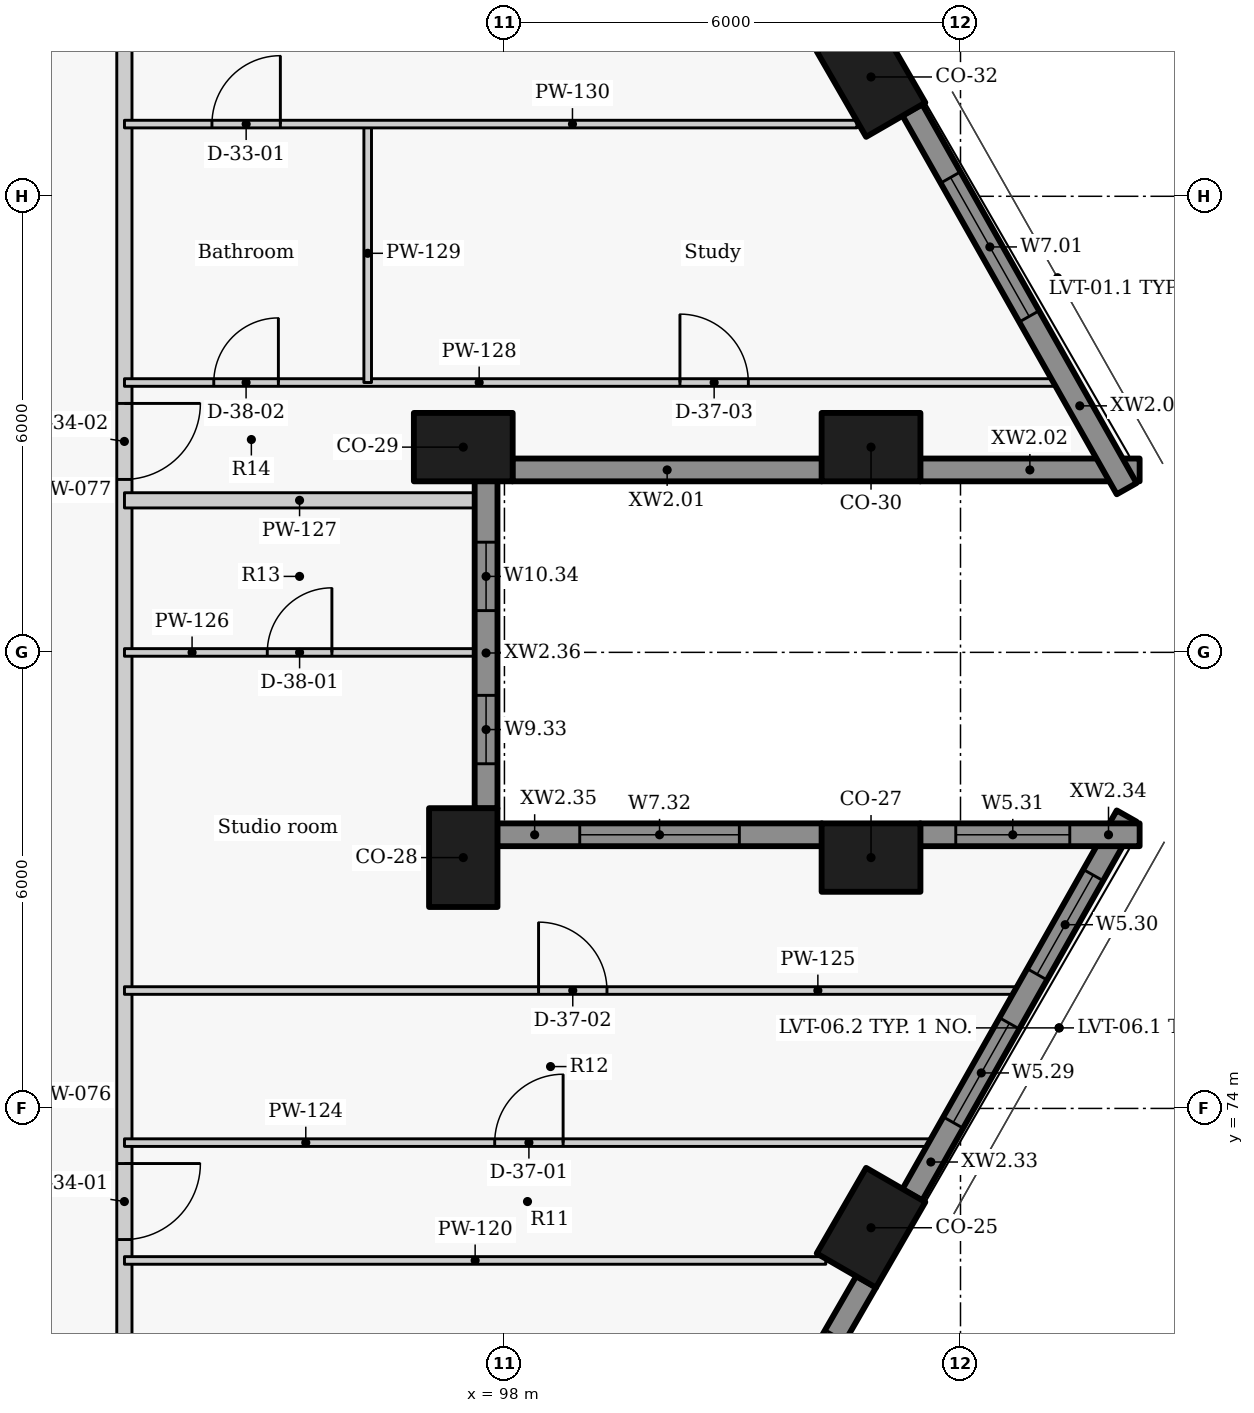
"""IFC4 building model, lengths in metres.
Left out: names, types, materials, properties, quantities, classifications, styles, units other than length and angle.
Written with IfcOpenShell. Run it as: python <this file> out.ifc"""

import sys

from ifc_helpers import new_model, si_unit, direction, frame, frame_2d, origin, origin_2d, place, context, subcontext, project, spatial, rectangle, extrude, element, fill, save


model = new_model("IFC4")
c1 = context("Model", 3, precision=1e-05, world=origin(), true_north=direction((0.0, 1.0)))
c2 = subcontext(c1, "Body", "Model", "MODEL_VIEW")
j1 = project(units=[si_unit("LENGTHUNIT", "METRE"), si_unit("PLANEANGLEUNIT", "RADIAN")], contexts=[c1])
p1 = place(None, origin())
s1 = spatial("IfcSite", under=j1, at=p1, CompositionType="ELEMENT")
p2 = place(p1, origin())
s2 = spatial("IfcBuilding", under=s1, at=p2, CompositionType="ELEMENT")
p3 = place(p2, frame((0.0, 0.0, 166.8)))
s3 = spatial("IfcBuildingStorey", under=s2, at=p3, CompositionType="ELEMENT", Elevation=166.8)
for number, where, z_axis, x_axis in (
    (1, (102.823, 72.43, 0.0), (0.0, 0.0, 1.0), (0.5, 0.866, 0.0)),
    (2, (102.823, 77.3, 0.0), (0.0, 0.0, 1.0), (-1.0, 0.0, 0.0)),
    (3, (97.458, 77.3, 0.0), (0.0, 0.0, 1.0), (0.0, 1.0, 0.0)),
    (4, (97.458, 82.7, 0.0), (0.0, 0.0, 1.0), (1.0, 0.0, 0.0)),
    (5, (102.823, 82.7, 0.0), (0.0, 0.0, 1.0), (1.0, 0.0, 0.0)),
    (6, (102.823, 87.57, 0.0), (0.0, 0.0, 1.0), (-0.5, 0.866, 0.0)),
):
    element("IfcColumn", number, at=place(p3, frame(where, z_axis=z_axis, x_axis=x_axis)), inside=s3, PredefinedType="COLUMN", context=c2, shape_type="SweptSolid", body=[
        extrude(rectangle(XDim=1.3, YDim=0.9, at=origin_2d()), origin(), (0.0, 0.0, 1.0), 3.3),
    ])
p4 = place(p3, frame((98.104, 82.4, 0.0), z_axis=(0.0, 0.0, 1.0), x_axis=(1.0, 0.0, 0.0)))
e7 = element("IfcWall", 7, at=p4, inside=s3, PredefinedType="SOLIDWALL", context=c2, shape_type="SweptSolid", body=[
    extrude(rectangle(XDim=4.073, YDim=0.3, at=frame_2d((2.036, 0.0))), origin(), (0.0, 0.0, 1.0), 2.05),
])
p5 = place(p3, frame((103.469, 82.4, 0.0), z_axis=(0.0, 0.0, 1.0), x_axis=(1.0, 0.0, 0.0)))
e8 = element("IfcWall", 8, at=p5, inside=s3, PredefinedType="SOLIDWALL", context=c2, shape_type="SweptSolid", body=[
    extrude(rectangle(XDim=2.888, YDim=0.3, at=frame_2d((1.444, 0.0))), origin(), (0.0, 0.0, 1.0), 2.05),
])
p6 = place(p3, frame((106.186, 82.153, 0.0), z_axis=(0.0, 0.0, 1.0), x_axis=(-0.492498306264, 0.87031340236, 0.0)))
e9 = element("IfcWall", 9, at=p6, inside=s3, PredefinedType="SOLIDWALL", context=c2, shape_type="SweptSolid", body=[
    extrude(rectangle(XDim=5.727, YDim=0.3, at=frame_2d((2.863, 0.0))), origin(), (0.0, 0.0, 1.0), 2.05),
])
p7 = place(p6, frame((2.604, 0.0, 0.9)))
e10 = element("IfcOpeningElement", 10, at=p7, cuts=e9, PredefinedType="OPENING", context=c2, shape_type="SweptSolid", body=[
    extrude(rectangle(XDim=2.1, YDim=1.1, at=frame_2d((1.05, 0.55))), frame((0.0, 0.16, 0.0), z_axis=(0.0, -1.0, 0.0), x_axis=(1.0, 0.0, 0.0)), (0.0, 0.0, 1.0), 0.32),
])
p8 = place(p3, frame((100.891, 68.485, 0.0), z_axis=(0.0, 0.0, 1.0), x_axis=(0.499933594891, 0.866063739398, 0.0)))
e11 = element("IfcWall", 11, at=p8, inside=s3, PredefinedType="SOLIDWALL", context=c2, shape_type="SweptSolid", body=[
    extrude(rectangle(XDim=3.737, YDim=0.3, at=frame_2d((1.868, 0.0))), origin(), (0.0, 0.0, 1.0), 2.05),
])
p9 = place(p8, frame((0.818, 0.0, 0.9)))
e12 = element("IfcOpeningElement", 12, at=p9, cuts=e11, PredefinedType="OPENING", context=c2, shape_type="SweptSolid", body=[
    extrude(rectangle(XDim=2.1, YDim=1.1, at=frame_2d((1.05, 0.55))), frame((0.0, 0.16, 0.0), z_axis=(0.0, -1.0, 0.0), x_axis=(1.0, 0.0, 0.0)), (0.0, 0.0, 1.0), 0.32),
])
p10 = place(p3, frame((103.366, 72.863, 0.0), z_axis=(0.0, 0.0, 1.0), x_axis=(0.492498306264, 0.87031340236, 0.0)))
e13 = element("IfcWall", 13, at=p10, inside=s3, PredefinedType="SOLIDWALL", context=c2, shape_type="SweptSolid", body=[
    extrude(rectangle(XDim=5.727, YDim=0.3, at=frame_2d((2.863, 0.0))), origin(), (0.0, 0.0, 1.0), 2.05),
])
p11 = place(p10, frame((1.093, 0.0, 0.9)))
e14 = element("IfcOpeningElement", 14, at=p11, cuts=e13, PredefinedType="OPENING", context=c2, shape_type="SweptSolid", body=[
    extrude(rectangle(XDim=1.5, YDim=1.1, at=frame_2d((0.75, 0.55))), frame((0.0, 0.16, 0.0), z_axis=(0.0, -1.0, 0.0), x_axis=(1.0, 0.0, 0.0)), (0.0, 0.0, 1.0), 0.32),
])
p12 = place(p10, frame((3.334, 0.0, 0.9)))
e15 = element("IfcOpeningElement", 15, at=p12, cuts=e13, PredefinedType="OPENING", context=c2, shape_type="SweptSolid", body=[
    extrude(rectangle(XDim=1.5, YDim=1.1, at=frame_2d((0.75, 0.55))), frame((0.0, 0.16, 0.0), z_axis=(0.0, -1.0, 0.0), x_axis=(1.0, 0.0, 0.0)), (0.0, 0.0, 1.0), 0.32),
])
p13 = place(p3, frame((106.357, 77.6, 0.0), z_axis=(0.0, 0.0, 1.0), x_axis=(-1.0, 0.0, 0.0)))
e16 = element("IfcWall", 16, at=p13, inside=s3, PredefinedType="SOLIDWALL", context=c2, shape_type="SweptSolid", body=[
    extrude(rectangle(XDim=2.888, YDim=0.3, at=frame_2d((1.444, 0.0))), origin(), (0.0, 0.0, 1.0), 2.05),
])
p14 = place(p13, frame((0.919, 0.0, 0.9)))
e17 = element("IfcOpeningElement", 17, at=p14, cuts=e16, PredefinedType="OPENING", context=c2, shape_type="SweptSolid", body=[
    extrude(rectangle(XDim=1.5, YDim=1.1, at=frame_2d((0.75, 0.55))), frame((0.0, 0.16, 0.0), z_axis=(0.0, -1.0, 0.0), x_axis=(1.0, 0.0, 0.0)), (0.0, 0.0, 1.0), 0.32),
])
p15 = place(p3, frame((102.177, 77.6, 0.0), z_axis=(0.0, 0.0, 1.0), x_axis=(-1.0, 0.0, 0.0)))
e18 = element("IfcWall", 18, at=p15, inside=s3, PredefinedType="SOLIDWALL", context=c2, shape_type="SweptSolid", body=[
    extrude(rectangle(XDim=4.273, YDim=0.3, at=frame_2d((2.136, 0.0))), origin(), (0.0, 0.0, 1.0), 2.05),
])
p16 = place(p15, frame((1.086, 0.0, 0.9)))
e19 = element("IfcOpeningElement", 19, at=p16, cuts=e18, PredefinedType="OPENING", context=c2, shape_type="SweptSolid", body=[
    extrude(rectangle(XDim=2.1, YDim=1.1, at=frame_2d((1.05, 0.55))), frame((0.0, 0.16, 0.0), z_axis=(0.0, -1.0, 0.0), x_axis=(1.0, 0.0, 0.0)), (0.0, 0.0, 1.0), 0.32),
])
p17 = place(p3, frame((97.758, 77.946, 0.0), z_axis=(0.0, 0.0, 1.0), x_axis=(0.0, 1.0, 0.0)))
e20 = element("IfcWall", 20, at=p17, inside=s3, PredefinedType="SOLIDWALL", context=c2, shape_type="SweptSolid", body=[
    extrude(rectangle(XDim=4.308, YDim=0.3, at=frame_2d((2.154, 0.0))), origin(), (0.0, 0.0, 1.0), 2.05),
])
p18 = place(p17, frame((0.588, 0.0, 0.9)))
e21 = element("IfcOpeningElement", 21, at=p18, cuts=e20, PredefinedType="OPENING", context=c2, shape_type="SweptSolid", body=[
    extrude(rectangle(XDim=0.9, YDim=1.1, at=frame_2d((0.45, 0.55))), frame((0.0, 0.16, 0.0), z_axis=(0.0, -1.0, 0.0), x_axis=(1.0, 0.0, 0.0)), (0.0, 0.0, 1.0), 0.32),
])
p19 = place(p17, frame((2.603, 0.0, 1.5)))
e22 = element("IfcOpeningElement", 22, at=p19, cuts=e20, PredefinedType="OPENING", context=c2, shape_type="SweptSolid", body=[
    extrude(rectangle(XDim=0.9, YDim=0.5, at=frame_2d((0.45, 0.25))), frame((0.0, 0.16, 0.0), z_axis=(0.0, -1.0, 0.0), x_axis=(1.0, 0.0, 0.0)), (0.0, 0.0, 1.0), 0.32),
])
p20 = place(p3, frame((93.0, 102.498, 0.0), z_axis=(0.0, 0.0, 1.0), x_axis=(0.0, -1.0, 0.0)))
e23 = element("IfcWall", 23, at=p20, inside=s3, PredefinedType="PARTITIONING", context=c2, shape_type="SweptSolid", body=[
    extrude(rectangle(XDim=45.665, YDim=0.2, at=frame_2d((22.833, 0.0))), origin(), (0.0, 0.0, 1.0), 2.03),
])
p21 = place(p20, frame((37.581, 0.0, 0.0)))
e24 = element("IfcOpeningElement", 24, at=p21, cuts=e23, PredefinedType="OPENING", context=c2, shape_type="SweptSolid", body=[
    extrude(rectangle(XDim=1.0, YDim=2.01, at=frame_2d((0.5, 1.005))), frame((0.0, 0.11, 0.0), z_axis=(0.0, -1.0, 0.0), x_axis=(1.0, 0.0, 0.0)), (0.0, 0.0, 1.0), 0.22),
])
p22 = place(p20, frame((29.223, 0.0, 0.0)))
e25 = element("IfcOpeningElement", 25, at=p22, cuts=e23, PredefinedType="OPENING", context=c2, shape_type="SweptSolid", body=[
    extrude(rectangle(XDim=1.0, YDim=2.01, at=frame_2d((0.5, 1.005))), frame((0.0, 0.11, 0.0), z_axis=(0.0, -1.0, 0.0), x_axis=(1.0, 0.0, 0.0)), (0.0, 0.0, 1.0), 0.22),
])
p23 = place(p20, frame((19.223, 0.0, 0.0)))
e26 = element("IfcOpeningElement", 26, at=p23, cuts=e23, PredefinedType="OPENING", context=c2, shape_type="SweptSolid", body=[
    extrude(rectangle(XDim=1.0, YDim=2.01, at=frame_2d((0.5, 1.005))), frame((0.0, 0.11, 0.0), z_axis=(0.0, -1.0, 0.0), x_axis=(1.0, 0.0, 0.0)), (0.0, 0.0, 1.0), 0.22),
])
p24 = place(p3, frame((93.001, 72.0, 0.0), z_axis=(0.0, 0.0, 1.0), x_axis=(1.0, 0.0, 0.0)))
e27 = element("IfcWall", 27, at=p24, inside=s3, PredefinedType="PARTITIONING", context=c2, shape_type="SweptSolid", body=[
    extrude(rectangle(XDim=9.227, YDim=0.1, at=frame_2d((4.614, 0.0))), origin(), (0.0, 0.0, 1.0), 2.95),
])
p25 = place(p3, frame((93.001, 73.55, 0.0), z_axis=(0.0, 0.0, 1.0), x_axis=(1.0, 0.0, 0.0)))
e28 = element("IfcWall", 28, at=p25, inside=s3, PredefinedType="PARTITIONING", context=c2, shape_type="SweptSolid", body=[
    extrude(rectangle(XDim=10.642, YDim=0.1, at=frame_2d((5.321, 0.0))), origin(), (0.0, 0.0, 1.0), 2.03),
])
p26 = place(p25, frame((4.871, 0.0, 0.0)))
e29 = element("IfcOpeningElement", 29, at=p26, cuts=e28, PredefinedType="OPENING", context=c2, shape_type="SweptSolid", body=[
    extrude(rectangle(XDim=0.9, YDim=2.01, at=frame_2d((0.45, 1.005))), frame((0.0, 0.06, 0.0), z_axis=(0.0, -1.0, 0.0), x_axis=(1.0, 0.0, 0.0)), (0.0, 0.0, 1.0), 0.12),
])
p27 = place(p3, frame((93.001, 75.551, 0.0), z_axis=(0.0, 0.0, 1.0), x_axis=(1.0, 0.0, 0.0)))
e30 = element("IfcWall", 30, at=p27, inside=s3, PredefinedType="PARTITIONING", context=c2, shape_type="SweptSolid", body=[
    extrude(rectangle(XDim=11.797, YDim=0.1, at=frame_2d((5.898, 0.0))), origin(), (0.0, 0.0, 1.0), 2.03),
])
p28 = place(p27, frame((5.448, 0.0, 0.0)))
e31 = element("IfcOpeningElement", 31, at=p28, cuts=e30, PredefinedType="OPENING", context=c2, shape_type="SweptSolid", body=[
    extrude(rectangle(XDim=0.9, YDim=2.01, at=frame_2d((0.45, 1.005))), frame((0.0, 0.06, 0.0), z_axis=(0.0, -1.0, 0.0), x_axis=(1.0, 0.0, 0.0)), (0.0, 0.0, 1.0), 0.12),
])
p29 = place(p3, frame((93.001, 79.999, 0.0), z_axis=(0.0, 0.0, 1.0), x_axis=(1.0, 0.0, 0.0)))
e32 = element("IfcWall", 32, at=p29, inside=s3, PredefinedType="PARTITIONING", context=c2, shape_type="SweptSolid", body=[
    extrude(rectangle(XDim=4.607, YDim=0.1, at=frame_2d((2.304, 0.0))), origin(), (0.0, 0.0, 1.0), 2.03),
])
p30 = place(p29, frame((1.879, 0.0, 0.0)))
e33 = element("IfcOpeningElement", 33, at=p30, cuts=e32, PredefinedType="OPENING", context=c2, shape_type="SweptSolid", body=[
    extrude(rectangle(XDim=0.85, YDim=2.01, at=frame_2d((0.425, 1.005))), frame((0.0, 0.06, 0.0), z_axis=(0.0, -1.0, 0.0), x_axis=(1.0, 0.0, 0.0)), (0.0, 0.0, 1.0), 0.12),
])
p31 = place(p3, frame((93.001, 82.0, 0.0), z_axis=(0.0, 0.0, 1.0), x_axis=(1.0, 0.0, 0.0)))
e34 = element("IfcWall", 34, at=p31, inside=s3, PredefinedType="PARTITIONING", context=c2, shape_type="SweptSolid", body=[
    extrude(rectangle(XDim=4.607, YDim=0.2, at=frame_2d((2.304, 0.0))), origin(), (0.0, 0.0, 1.0), 2.03),
])
p32 = place(p3, frame((93.001, 83.55, 0.0), z_axis=(0.0, 0.0, 1.0), x_axis=(1.0, 0.0, 0.0)))
e35 = element("IfcWall", 35, at=p32, inside=s3, PredefinedType="PARTITIONING", context=c2, shape_type="SweptSolid", body=[
    extrude(rectangle(XDim=12.316, YDim=0.1, at=frame_2d((6.158, 0.0))), origin(), (0.0, 0.0, 1.0), 2.03),
])
p33 = place(p32, frame((1.175, 0.0, 0.0)))
e36 = element("IfcOpeningElement", 36, at=p33, cuts=e35, PredefinedType="OPENING", context=c2, shape_type="SweptSolid", body=[
    extrude(rectangle(XDim=0.85, YDim=2.01, at=frame_2d((0.425, 1.005))), frame((0.0, 0.06, 0.0), z_axis=(0.0, -1.0, 0.0), x_axis=(1.0, 0.0, 0.0)), (0.0, 0.0, 1.0), 0.12),
])
p34 = place(p32, frame((7.308, 0.0, 0.0)))
e37 = element("IfcOpeningElement", 37, at=p34, cuts=e35, PredefinedType="OPENING", context=c2, shape_type="SweptSolid", body=[
    extrude(rectangle(XDim=0.9, YDim=2.01, at=frame_2d((0.45, 1.005))), frame((0.0, 0.06, 0.0), z_axis=(0.0, -1.0, 0.0), x_axis=(1.0, 0.0, 0.0)), (0.0, 0.0, 1.0), 0.12),
])
p35 = place(p3, frame((96.201, 83.55, 0.0), z_axis=(0.0, 0.0, 1.0), x_axis=(0.0, 1.0, 0.0)))
e38 = element("IfcWall", 38, at=p35, inside=s3, PredefinedType="PARTITIONING", context=c2, shape_type="SweptSolid", body=[
    extrude(rectangle(XDim=3.4, YDim=0.1, at=frame_2d((1.7, 0.0))), origin(), (0.0, 0.0, 1.0), 2.95),
])
p36 = place(p3, frame((93.001, 86.95, 0.0), z_axis=(0.0, 0.0, 1.0), x_axis=(1.0, 0.0, 0.0)))
e39 = element("IfcWall", 39, at=p36, inside=s3, PredefinedType="PARTITIONING", context=c2, shape_type="SweptSolid", body=[
    extrude(rectangle(XDim=9.637, YDim=0.1, at=frame_2d((4.818, 0.0))), origin(), (0.0, 0.0, 1.0), 2.95),
])
p37 = place(p36, frame((1.151, 0.0, 0.0)))
e40 = element("IfcOpeningElement", 40, at=p37, cuts=e39, PredefinedType="OPENING", context=c2, shape_type="SweptSolid", body=[
    extrude(rectangle(XDim=0.9, YDim=2.1, at=frame_2d((0.45, 1.05))), frame((0.0, 0.06, 0.0), z_axis=(0.0, -1.0, 0.0), x_axis=(1.0, 0.0, 0.0)), (0.0, 0.0, 1.0), 0.12),
])
p38 = place(p7, origin())
e41 = element("IfcWindow", 41, at=p38, inside=s3, PartitioningType="SINGLE_PANEL", PredefinedType="WINDOW", context=c2, shape_type="SweptSolid", body=[
    extrude(rectangle(XDim=2.1, YDim=1.1, at=frame_2d((1.05, 0.55))), frame((0.0, 0.03, 0.0), z_axis=(0.0, -1.0, 0.0), x_axis=(1.0, 0.0, 0.0)), (0.0, 0.0, 1.0), 0.06),
])
fill(e10, e41)
p39 = place(p11, origin())
e42 = element("IfcWindow", 42, at=p39, inside=s3, PartitioningType="SINGLE_PANEL", PredefinedType="WINDOW", context=c2, shape_type="SweptSolid", body=[
    extrude(rectangle(XDim=1.5, YDim=1.1, at=frame_2d((0.75, 0.55))), frame((0.0, 0.03, 0.0), z_axis=(0.0, -1.0, 0.0), x_axis=(1.0, 0.0, 0.0)), (0.0, 0.0, 1.0), 0.06),
])
fill(e14, e42)
p40 = place(p12, origin())
e43 = element("IfcWindow", 43, at=p40, inside=s3, PartitioningType="SINGLE_PANEL", PredefinedType="WINDOW", context=c2, shape_type="SweptSolid", body=[
    extrude(rectangle(XDim=1.5, YDim=1.1, at=frame_2d((0.75, 0.55))), frame((0.0, 0.03, 0.0), z_axis=(0.0, -1.0, 0.0), x_axis=(1.0, 0.0, 0.0)), (0.0, 0.0, 1.0), 0.06),
])
fill(e15, e43)
p41 = place(p14, origin())
e44 = element("IfcWindow", 44, at=p41, inside=s3, PartitioningType="SINGLE_PANEL", PredefinedType="WINDOW", context=c2, shape_type="SweptSolid", body=[
    extrude(rectangle(XDim=1.5, YDim=1.1, at=frame_2d((0.75, 0.55))), frame((0.0, 0.03, 0.0), z_axis=(0.0, -1.0, 0.0), x_axis=(1.0, 0.0, 0.0)), (0.0, 0.0, 1.0), 0.06),
])
fill(e17, e44)
p42 = place(p16, origin())
e45 = element("IfcWindow", 45, at=p42, inside=s3, PartitioningType="SINGLE_PANEL", PredefinedType="WINDOW", context=c2, shape_type="SweptSolid", body=[
    extrude(rectangle(XDim=2.1, YDim=1.1, at=frame_2d((1.05, 0.55))), frame((0.0, 0.03, 0.0), z_axis=(0.0, -1.0, 0.0), x_axis=(1.0, 0.0, 0.0)), (0.0, 0.0, 1.0), 0.06),
])
fill(e19, e45)
p43 = place(p18, origin())
e46 = element("IfcWindow", 46, at=p43, inside=s3, PartitioningType="SINGLE_PANEL", PredefinedType="WINDOW", context=c2, shape_type="SweptSolid", body=[
    extrude(rectangle(XDim=0.9, YDim=1.1, at=frame_2d((0.45, 0.55))), frame((0.0, 0.03, 0.0), z_axis=(0.0, -1.0, 0.0), x_axis=(1.0, 0.0, 0.0)), (0.0, 0.0, 1.0), 0.06),
])
fill(e21, e46)
p44 = place(p19, origin())
e47 = element("IfcWindow", 47, at=p44, inside=s3, PartitioningType="SINGLE_PANEL", PredefinedType="WINDOW", context=c2, shape_type="SweptSolid", body=[
    extrude(rectangle(XDim=0.9, YDim=0.5, at=frame_2d((0.45, 0.25))), frame((0.0, 0.03, 0.0), z_axis=(0.0, -1.0, 0.0), x_axis=(1.0, 0.0, 0.0)), (0.0, 0.0, 1.0), 0.06),
])
fill(e22, e47)
p45 = place(p22, origin())
e48 = element("IfcDoor", 48, at=p45, inside=s3, OperationType="SINGLE_SWING_LEFT", PredefinedType="DOOR", context=c2, shape_type="SweptSolid", body=[
    extrude(rectangle(XDim=1.0, YDim=2.01, at=frame_2d((0.5, 1.005))), frame((0.0, 0.025, 0.0), z_axis=(0.0, -1.0, 0.0), x_axis=(1.0, 0.0, 0.0)), (0.0, 0.0, 1.0), 0.05),
])
fill(e25, e48)
p46 = place(p26, origin())
e49 = element("IfcDoor", 49, at=p46, inside=s3, OperationType="SINGLE_SWING_RIGHT", PredefinedType="DOOR", context=c2, shape_type="SweptSolid", body=[
    extrude(rectangle(XDim=0.9, YDim=2.01, at=frame_2d((0.45, 1.005))), frame((0.0, 0.025, 0.0), z_axis=(0.0, -1.0, 0.0), x_axis=(1.0, 0.0, 0.0)), (0.0, 0.0, 1.0), 0.05),
])
fill(e29, e49)
p47 = place(p28, origin())
e50 = element("IfcDoor", 50, at=p47, inside=s3, OperationType="SINGLE_SWING_LEFT", PredefinedType="DOOR", context=c2, shape_type="SweptSolid", body=[
    extrude(rectangle(XDim=0.9, YDim=2.01, at=frame_2d((0.45, 1.005))), frame((0.0, 0.025, 0.0), z_axis=(0.0, -1.0, 0.0), x_axis=(1.0, 0.0, 0.0)), (0.0, 0.0, 1.0), 0.05),
])
fill(e31, e50)
p48 = place(p30, origin())
e51 = element("IfcDoor", 51, at=p48, inside=s3, OperationType="SINGLE_SWING_RIGHT", PredefinedType="DOOR", context=c2, shape_type="SweptSolid", body=[
    extrude(rectangle(XDim=0.85, YDim=2.01, at=frame_2d((0.425, 1.005))), frame((0.0, 0.025, 0.0), z_axis=(0.0, -1.0, 0.0), x_axis=(1.0, 0.0, 0.0)), (0.0, 0.0, 1.0), 0.05),
])
fill(e33, e51)
p49 = place(p23, origin())
e52 = element("IfcDoor", 52, at=p49, inside=s3, OperationType="SINGLE_SWING_LEFT", PredefinedType="DOOR", context=c2, shape_type="SweptSolid", body=[
    extrude(rectangle(XDim=1.0, YDim=2.01, at=frame_2d((0.5, 1.005))), frame((0.0, 0.025, 0.0), z_axis=(0.0, -1.0, 0.0), x_axis=(1.0, 0.0, 0.0)), (0.0, 0.0, 1.0), 0.05),
])
fill(e26, e52)
p50 = place(p33, origin())
e53 = element("IfcDoor", 53, at=p50, inside=s3, OperationType="SINGLE_SWING_RIGHT", PredefinedType="DOOR", context=c2, shape_type="SweptSolid", body=[
    extrude(rectangle(XDim=0.85, YDim=2.01, at=frame_2d((0.425, 1.005))), frame((0.0, 0.025, 0.0), z_axis=(0.0, -1.0, 0.0), x_axis=(1.0, 0.0, 0.0)), (0.0, 0.0, 1.0), 0.05),
])
fill(e36, e53)
p51 = place(p34, origin())
e54 = element("IfcDoor", 54, at=p51, inside=s3, OperationType="SINGLE_SWING_LEFT", PredefinedType="DOOR", context=c2, shape_type="SweptSolid", body=[
    extrude(rectangle(XDim=0.9, YDim=2.01, at=frame_2d((0.45, 1.005))), frame((0.0, 0.025, 0.0), z_axis=(0.0, -1.0, 0.0), x_axis=(1.0, 0.0, 0.0)), (0.0, 0.0, 1.0), 0.05),
])
fill(e37, e54)
p52 = place(p37, origin())
e55 = element("IfcDoor", 55, at=p52, inside=s3, OperationType="SINGLE_SWING_RIGHT", PredefinedType="DOOR", context=c2, shape_type="SweptSolid", body=[
    extrude(rectangle(XDim=0.9, YDim=2.1, at=frame_2d((0.45, 1.05))), frame((0.0, 0.025, 0.0), z_axis=(0.0, -1.0, 0.0), x_axis=(1.0, 0.0, 0.0)), (0.0, 0.0, 1.0), 0.05),
])
fill(e40, e55)
save(model, sys.argv[1])
